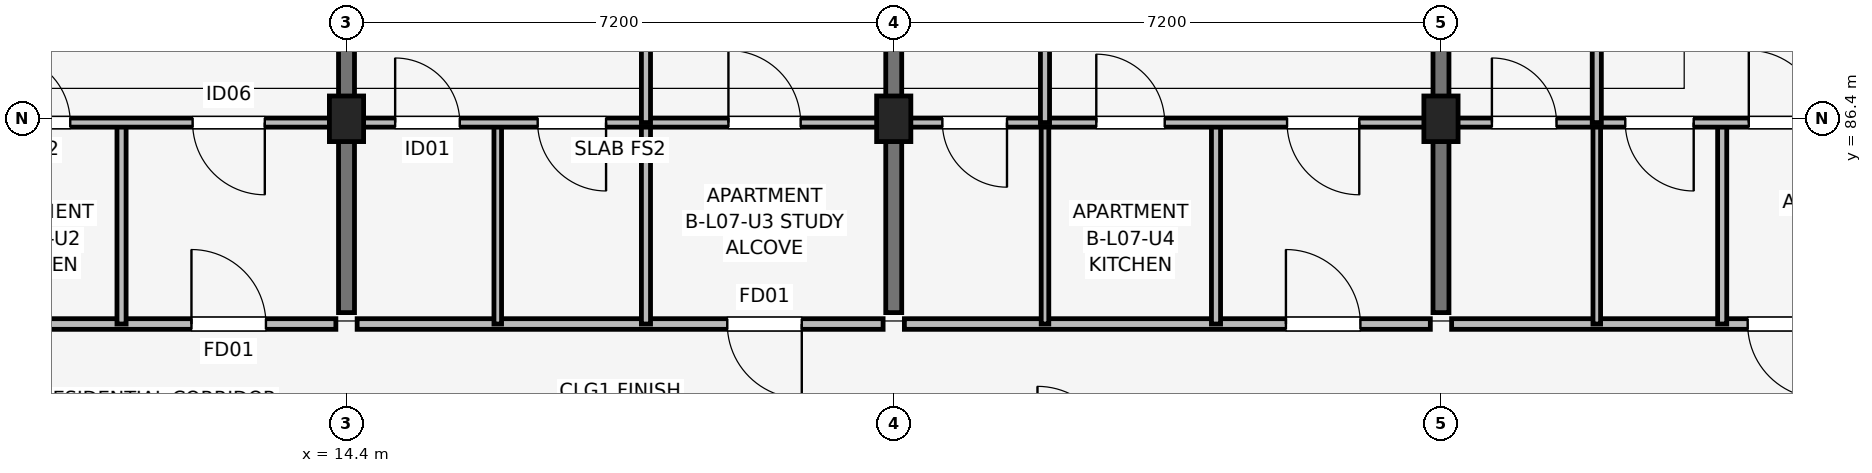
"""IFC4 building model, lengths in metres.
Left out: names, types, materials, properties, quantities, classifications, styles, units other than length and angle.
Written with IfcOpenShell. Run it as: python <this file> out.ifc"""

import sys

from ifc_helpers import new_model, si_unit, direction, frame, frame_2d, origin, origin_2d, place, context, subcontext, project, spatial, rectangle, extrude, element, fill, save


model = new_model("IFC4")
c1 = context("Model", 3, precision=1e-05, world=origin(), true_north=direction((0.0, 1.0)))
c2 = subcontext(c1, "Body", "Model", "MODEL_VIEW")
j1 = project(units=[si_unit("LENGTHUNIT", "METRE"), si_unit("PLANEANGLEUNIT", "RADIAN")], contexts=[c1])
p1 = place(None, origin())
s1 = spatial("IfcSite", under=j1, at=p1, CompositionType="ELEMENT")
p2 = place(p1, origin())
s2 = spatial("IfcBuilding", under=s1, at=p2, CompositionType="ELEMENT")
p3 = place(p2, frame((0.0, 0.0, 24.45)))
s3 = spatial("IfcBuildingStorey", under=s2, at=p3, CompositionType="ELEMENT", Elevation=24.45)
for number, where, z_axis, x_axis in (
    (1, (14.4, 86.4, 0.0), (0.0, 0.0, 1.0), (1.0, 0.0, 0.0)),
    (2, (21.6, 86.4, 0.0), (0.0, 0.0, 1.0), (1.0, 0.0, 0.0)),
    (3, (28.8, 86.4, 0.0), (0.0, 0.0, 1.0), (1.0, 0.0, 0.0)),
):
    element("IfcColumn", number, at=place(p3, frame(where, z_axis=z_axis, x_axis=x_axis)), inside=s3, PredefinedType="COLUMN", context=c2, shape_type="SweptSolid", body=[
        extrude(rectangle(XDim=0.45, YDim=0.6, at=origin_2d()), origin(), (0.0, 0.0, 1.0), 3.15),
    ])
for number, where, z_axis, x_axis in (
    (4, (14.4, 83.85, 0.0), (0.0, 0.0, 1.0), (0.0, 1.0, 0.0)),
    (5, (21.6, 83.85, 0.0), (0.0, 0.0, 1.0), (0.0, 1.0, 0.0)),
    (6, (28.8, 83.85, 0.0), (0.0, 0.0, 1.0), (0.0, 1.0, 0.0)),
):
    element("IfcWall", number, at=place(p3, frame(where, z_axis=z_axis, x_axis=x_axis)), inside=s3, PredefinedType="SHEAR", context=c2, shape_type="SweptSolid", body=[
        extrude(rectangle(XDim=9.4, YDim=0.21, at=frame_2d((4.7, 0.0))), origin(), (0.0, 0.0, 1.0), 3.15),
    ])
p4 = place(p3, frame((7.34, 83.7, 0.0), z_axis=(0.0, 0.0, 1.0), x_axis=(1.0, 0.0, 0.0)))
e7 = element("IfcWall", 7, at=p4, inside=s3, PredefinedType="PARTITIONING", context=c2, shape_type="SweptSolid", body=[
    extrude(rectangle(XDim=6.92, YDim=0.14, at=frame_2d((3.46, 0.0))), origin(), (0.0, 0.0, 1.0), 2.38),
])
p5 = place(p4, frame((5.02, 0.0, 0.0)))
e8 = element("IfcOpeningElement", 8, at=p5, cuts=e7, PredefinedType="OPENING", context=c2, shape_type="SweptSolid", body=[
    extrude(rectangle(XDim=0.98, YDim=2.1, at=frame_2d((0.49, 1.05))), frame((0.0, 0.08, 0.0), z_axis=(0.0, -1.0, 0.0), x_axis=(1.0, 0.0, 0.0)), (0.0, 0.0, 1.0), 0.16),
])
p6 = place(p3, frame((11.44, 83.7, 0.0), z_axis=(0.0, 0.0, 1.0), x_axis=(0.0, 1.0, 0.0)))
e9 = element("IfcWall", 9, at=p6, inside=s3, PredefinedType="PARTITIONING", context=c2, shape_type="SweptSolid", body=[
    extrude(rectangle(XDim=2.65, YDim=0.12, at=frame_2d((1.325, 0.0))), origin(), (0.0, 0.0, 1.0), 2.38),
])
p7 = place(p3, frame((7.34, 86.35, 0.0), z_axis=(0.0, 0.0, 1.0), x_axis=(1.0, 0.0, 0.0)))
e10 = element("IfcWall", 10, at=p7, inside=s3, PredefinedType="PARTITIONING", context=c2, shape_type="SweptSolid", body=[
    extrude(rectangle(XDim=6.92, YDim=0.12, at=frame_2d((3.46, 0.0))), origin(), (0.0, 0.0, 1.0), 2.38),
])
p8 = place(p7, frame((1.35, 0.0, 0.0), z_axis=(0.0, 0.0, 1.0), x_axis=(-1.0, 0.0, 0.0)))
e11 = element("IfcOpeningElement", 11, at=p8, cuts=e10, PredefinedType="OPENING", context=c2, shape_type="SweptSolid", body=[
    extrude(rectangle(XDim=0.85, YDim=2.08, at=frame_2d((0.425, 1.04))), frame((0.0, 0.07, 0.0), z_axis=(0.0, -1.0, 0.0), x_axis=(1.0, 0.0, 0.0)), (0.0, 0.0, 1.0), 0.14),
])
p9 = place(p7, frame((2.525, 0.0, 0.0)))
e12 = element("IfcOpeningElement", 12, at=p9, cuts=e10, PredefinedType="OPENING", context=c2, shape_type="SweptSolid", body=[
    extrude(rectangle(XDim=0.9, YDim=2.08, at=frame_2d((0.45, 1.04))), frame((0.0, 0.07, 0.0), z_axis=(0.0, -1.0, 0.0), x_axis=(1.0, 0.0, 0.0)), (0.0, 0.0, 1.0), 0.14),
])
p10 = place(p7, frame((5.985, 0.0, 0.0), z_axis=(0.0, 0.0, 1.0), x_axis=(-1.0, 0.0, 0.0)))
e13 = element("IfcOpeningElement", 13, at=p10, cuts=e10, PredefinedType="OPENING", context=c2, shape_type="SweptSolid", body=[
    extrude(rectangle(XDim=0.95, YDim=2.08, at=frame_2d((0.475, 1.04))), frame((0.0, 0.07, 0.0), z_axis=(0.0, -1.0, 0.0), x_axis=(1.0, 0.0, 0.0)), (0.0, 0.0, 1.0), 0.14),
])
p11 = place(p3, frame((14.54, 83.7, 0.0), z_axis=(0.0, 0.0, 1.0), x_axis=(1.0, 0.0, 0.0)))
e14 = element("IfcWall", 14, at=p11, inside=s3, PredefinedType="PARTITIONING", context=c2, shape_type="SweptSolid", body=[
    extrude(rectangle(XDim=6.92, YDim=0.14, at=frame_2d((3.46, 0.0))), origin(), (0.0, 0.0, 1.0), 2.38),
])
p12 = place(p11, frame((5.85, 0.0, 0.0), z_axis=(0.0, 0.0, 1.0), x_axis=(-1.0, 0.0, 0.0)))
e15 = element("IfcOpeningElement", 15, at=p12, cuts=e14, PredefinedType="OPENING", context=c2, shape_type="SweptSolid", body=[
    extrude(rectangle(XDim=0.98, YDim=2.1, at=frame_2d((0.49, 1.05))), frame((0.0, 0.08, 0.0), z_axis=(0.0, -1.0, 0.0), x_axis=(1.0, 0.0, 0.0)), (0.0, 0.0, 1.0), 0.16),
])
p13 = place(p3, frame((16.39, 83.7, 0.0), z_axis=(0.0, 0.0, 1.0), x_axis=(0.0, 1.0, 0.0)))
e16 = element("IfcWall", 16, at=p13, inside=s3, PredefinedType="PARTITIONING", context=c2, shape_type="SweptSolid", body=[
    extrude(rectangle(XDim=2.65, YDim=0.1, at=frame_2d((1.325, 0.0))), origin(), (0.0, 0.0, 1.0), 2.38),
])
p14 = place(p3, frame((18.34, 83.7, 0.0), z_axis=(0.0, 0.0, 1.0), x_axis=(0.0, 1.0, 0.0)))
e17 = element("IfcWall", 17, at=p14, inside=s3, PredefinedType="PARTITIONING", context=c2, shape_type="SweptSolid", body=[
    extrude(rectangle(XDim=2.65, YDim=0.12, at=frame_2d((1.325, 0.0))), origin(), (0.0, 0.0, 1.0), 2.38),
])
p15 = place(p3, frame((14.54, 86.35, 0.0), z_axis=(0.0, 0.0, 1.0), x_axis=(1.0, 0.0, 0.0)))
e18 = element("IfcWall", 18, at=p15, inside=s3, PredefinedType="PARTITIONING", context=c2, shape_type="SweptSolid", body=[
    extrude(rectangle(XDim=6.92, YDim=0.12, at=frame_2d((3.46, 0.0))), origin(), (0.0, 0.0, 1.0), 2.38),
])
p16 = place(p15, frame((0.5, 0.0, 0.0)))
e19 = element("IfcOpeningElement", 19, at=p16, cuts=e18, PredefinedType="OPENING", context=c2, shape_type="SweptSolid", body=[
    extrude(rectangle(XDim=0.85, YDim=2.08, at=frame_2d((0.425, 1.04))), frame((0.0, 0.07, 0.0), z_axis=(0.0, -1.0, 0.0), x_axis=(1.0, 0.0, 0.0)), (0.0, 0.0, 1.0), 0.14),
])
p17 = place(p15, frame((3.275, 0.0, 0.0), z_axis=(0.0, 0.0, 1.0), x_axis=(-1.0, 0.0, 0.0)))
e20 = element("IfcOpeningElement", 20, at=p17, cuts=e18, PredefinedType="OPENING", context=c2, shape_type="SweptSolid", body=[
    extrude(rectangle(XDim=0.9, YDim=2.08, at=frame_2d((0.45, 1.04))), frame((0.0, 0.07, 0.0), z_axis=(0.0, -1.0, 0.0), x_axis=(1.0, 0.0, 0.0)), (0.0, 0.0, 1.0), 0.14),
])
p18 = place(p15, frame((4.885, 0.0, 0.0)))
e21 = element("IfcOpeningElement", 21, at=p18, cuts=e18, PredefinedType="OPENING", context=c2, shape_type="SweptSolid", body=[
    extrude(rectangle(XDim=0.95, YDim=2.08, at=frame_2d((0.475, 1.04))), frame((0.0, 0.07, 0.0), z_axis=(0.0, -1.0, 0.0), x_axis=(1.0, 0.0, 0.0)), (0.0, 0.0, 1.0), 0.14),
])
p19 = place(p3, frame((18.34, 86.35, 0.0), z_axis=(0.0, 0.0, 1.0), x_axis=(0.0, 1.0, 0.0)))
e22 = element("IfcWall", 22, at=p19, inside=s3, PredefinedType="PARTITIONING", context=c2, shape_type="SweptSolid", body=[
    extrude(rectangle(XDim=6.95, YDim=0.12, at=frame_2d((3.475, 0.0))), origin(), (0.0, 0.0, 1.0), 2.38),
])
p20 = place(p19, frame((3.925, 0.0, 0.0), z_axis=(0.0, 0.0, 1.0), x_axis=(-1.0, 0.0, 0.0)))
e23 = element("IfcOpeningElement", 23, at=p20, cuts=e22, PredefinedType="OPENING", context=c2, shape_type="SweptSolid", body=[
    extrude(rectangle(XDim=0.9, YDim=2.08, at=frame_2d((0.45, 1.04))), frame((0.0, 0.07, 0.0), z_axis=(0.0, -1.0, 0.0), x_axis=(1.0, 0.0, 0.0)), (0.0, 0.0, 1.0), 0.14),
])
p21 = place(p3, frame((21.74, 83.7, 0.0), z_axis=(0.0, 0.0, 1.0), x_axis=(1.0, 0.0, 0.0)))
e24 = element("IfcWall", 24, at=p21, inside=s3, PredefinedType="PARTITIONING", context=c2, shape_type="SweptSolid", body=[
    extrude(rectangle(XDim=6.92, YDim=0.14, at=frame_2d((3.46, 0.0))), origin(), (0.0, 0.0, 1.0), 2.38),
])
p22 = place(p21, frame((5.02, 0.0, 0.0)))
e25 = element("IfcOpeningElement", 25, at=p22, cuts=e24, PredefinedType="OPENING", context=c2, shape_type="SweptSolid", body=[
    extrude(rectangle(XDim=0.98, YDim=2.1, at=frame_2d((0.49, 1.05))), frame((0.0, 0.08, 0.0), z_axis=(0.0, -1.0, 0.0), x_axis=(1.0, 0.0, 0.0)), (0.0, 0.0, 1.0), 0.16),
])
p23 = place(p3, frame((23.59, 83.7, 0.0), z_axis=(0.0, 0.0, 1.0), x_axis=(0.0, 1.0, 0.0)))
e26 = element("IfcWall", 26, at=p23, inside=s3, PredefinedType="PARTITIONING", context=c2, shape_type="SweptSolid", body=[
    extrude(rectangle(XDim=2.65, YDim=0.1, at=frame_2d((1.325, 0.0))), origin(), (0.0, 0.0, 1.0), 2.38),
])
p24 = place(p3, frame((25.84, 83.7, 0.0), z_axis=(0.0, 0.0, 1.0), x_axis=(0.0, 1.0, 0.0)))
e27 = element("IfcWall", 27, at=p24, inside=s3, PredefinedType="PARTITIONING", context=c2, shape_type="SweptSolid", body=[
    extrude(rectangle(XDim=2.65, YDim=0.12, at=frame_2d((1.325, 0.0))), origin(), (0.0, 0.0, 1.0), 2.38),
])
p25 = place(p3, frame((21.74, 86.35, 0.0), z_axis=(0.0, 0.0, 1.0), x_axis=(1.0, 0.0, 0.0)))
e28 = element("IfcWall", 28, at=p25, inside=s3, PredefinedType="PARTITIONING", context=c2, shape_type="SweptSolid", body=[
    extrude(rectangle(XDim=6.92, YDim=0.12, at=frame_2d((3.46, 0.0))), origin(), (0.0, 0.0, 1.0), 2.38),
])
p26 = place(p25, frame((1.35, 0.0, 0.0), z_axis=(0.0, 0.0, 1.0), x_axis=(-1.0, 0.0, 0.0)))
e29 = element("IfcOpeningElement", 29, at=p26, cuts=e28, PredefinedType="OPENING", context=c2, shape_type="SweptSolid", body=[
    extrude(rectangle(XDim=0.85, YDim=2.08, at=frame_2d((0.425, 1.04))), frame((0.0, 0.07, 0.0), z_axis=(0.0, -1.0, 0.0), x_axis=(1.0, 0.0, 0.0)), (0.0, 0.0, 1.0), 0.14),
])
p27 = place(p25, frame((2.525, 0.0, 0.0)))
e30 = element("IfcOpeningElement", 30, at=p27, cuts=e28, PredefinedType="OPENING", context=c2, shape_type="SweptSolid", body=[
    extrude(rectangle(XDim=0.9, YDim=2.08, at=frame_2d((0.45, 1.04))), frame((0.0, 0.07, 0.0), z_axis=(0.0, -1.0, 0.0), x_axis=(1.0, 0.0, 0.0)), (0.0, 0.0, 1.0), 0.14),
])
p28 = place(p25, frame((5.985, 0.0, 0.0), z_axis=(0.0, 0.0, 1.0), x_axis=(-1.0, 0.0, 0.0)))
e31 = element("IfcOpeningElement", 31, at=p28, cuts=e28, PredefinedType="OPENING", context=c2, shape_type="SweptSolid", body=[
    extrude(rectangle(XDim=0.95, YDim=2.08, at=frame_2d((0.475, 1.04))), frame((0.0, 0.07, 0.0), z_axis=(0.0, -1.0, 0.0), x_axis=(1.0, 0.0, 0.0)), (0.0, 0.0, 1.0), 0.14),
])
p29 = place(p3, frame((23.59, 86.35, 0.0), z_axis=(0.0, 0.0, 1.0), x_axis=(0.0, 1.0, 0.0)))
e32 = element("IfcWall", 32, at=p29, inside=s3, PredefinedType="PARTITIONING", context=c2, shape_type="SweptSolid", body=[
    extrude(rectangle(XDim=6.95, YDim=0.12, at=frame_2d((3.475, 0.0))), origin(), (0.0, 0.0, 1.0), 2.38),
])
p30 = place(p29, frame((3.025, 0.0, 0.0)))
e33 = element("IfcOpeningElement", 33, at=p30, cuts=e32, PredefinedType="OPENING", context=c2, shape_type="SweptSolid", body=[
    extrude(rectangle(XDim=0.9, YDim=2.08, at=frame_2d((0.45, 1.04))), frame((0.0, 0.07, 0.0), z_axis=(0.0, -1.0, 0.0), x_axis=(1.0, 0.0, 0.0)), (0.0, 0.0, 1.0), 0.14),
])
p31 = place(p3, frame((28.94, 83.7, 0.0), z_axis=(0.0, 0.0, 1.0), x_axis=(1.0, 0.0, 0.0)))
e34 = element("IfcWall", 34, at=p31, inside=s3, PredefinedType="PARTITIONING", context=c2, shape_type="SweptSolid", body=[
    extrude(rectangle(XDim=6.92, YDim=0.14, at=frame_2d((3.46, 0.0))), origin(), (0.0, 0.0, 1.0), 2.38),
])
p32 = place(p31, frame((4.875, 0.0, 0.0), z_axis=(0.0, 0.0, 1.0), x_axis=(-1.0, 0.0, 0.0)))
e35 = element("IfcOpeningElement", 35, at=p32, cuts=e34, PredefinedType="OPENING", context=c2, shape_type="SweptSolid", body=[
    extrude(rectangle(XDim=0.98, YDim=2.1, at=frame_2d((0.49, 1.05))), frame((0.0, 0.08, 0.0), z_axis=(0.0, -1.0, 0.0), x_axis=(1.0, 0.0, 0.0)), (0.0, 0.0, 1.0), 0.16),
])
p33 = place(p3, frame((30.85, 83.7, 0.0), z_axis=(0.0, 0.0, 1.0), x_axis=(0.0, 1.0, 0.0)))
e36 = element("IfcWall", 36, at=p33, inside=s3, PredefinedType="PARTITIONING", context=c2, shape_type="SweptSolid", body=[
    extrude(rectangle(XDim=2.65, YDim=0.1, at=frame_2d((1.325, 0.0))), origin(), (0.0, 0.0, 1.0), 2.38),
])
p34 = place(p3, frame((32.5, 83.7, 0.0), z_axis=(0.0, 0.0, 1.0), x_axis=(0.0, 1.0, 0.0)))
e37 = element("IfcWall", 37, at=p34, inside=s3, PredefinedType="PARTITIONING", context=c2, shape_type="SweptSolid", body=[
    extrude(rectangle(XDim=2.65, YDim=0.12, at=frame_2d((1.325, 0.0))), origin(), (0.0, 0.0, 1.0), 2.38),
])
p35 = place(p3, frame((28.94, 86.35, 0.0), z_axis=(0.0, 0.0, 1.0), x_axis=(1.0, 0.0, 0.0)))
e38 = element("IfcWall", 38, at=p35, inside=s3, PredefinedType="PARTITIONING", context=c2, shape_type="SweptSolid", body=[
    extrude(rectangle(XDim=6.92, YDim=0.12, at=frame_2d((3.46, 0.0))), origin(), (0.0, 0.0, 1.0), 2.38),
])
p36 = place(p35, frame((0.53, 0.0, 0.0)))
e39 = element("IfcOpeningElement", 39, at=p36, cuts=e38, PredefinedType="OPENING", context=c2, shape_type="SweptSolid", body=[
    extrude(rectangle(XDim=0.85, YDim=2.08, at=frame_2d((0.425, 1.04))), frame((0.0, 0.07, 0.0), z_axis=(0.0, -1.0, 0.0), x_axis=(1.0, 0.0, 0.0)), (0.0, 0.0, 1.0), 0.14),
])
p37 = place(p35, frame((3.185, 0.0, 0.0), z_axis=(0.0, 0.0, 1.0), x_axis=(-1.0, 0.0, 0.0)))
e40 = element("IfcOpeningElement", 40, at=p37, cuts=e38, PredefinedType="OPENING", context=c2, shape_type="SweptSolid", body=[
    extrude(rectangle(XDim=0.9, YDim=2.08, at=frame_2d((0.45, 1.04))), frame((0.0, 0.07, 0.0), z_axis=(0.0, -1.0, 0.0), x_axis=(1.0, 0.0, 0.0)), (0.0, 0.0, 1.0), 0.14),
])
p38 = place(p35, frame((3.91, 0.0, 0.0)))
e41 = element("IfcOpeningElement", 41, at=p38, cuts=e38, PredefinedType="OPENING", context=c2, shape_type="SweptSolid", body=[
    extrude(rectangle(XDim=0.95, YDim=2.08, at=frame_2d((0.475, 1.04))), frame((0.0, 0.07, 0.0), z_axis=(0.0, -1.0, 0.0), x_axis=(1.0, 0.0, 0.0)), (0.0, 0.0, 1.0), 0.14),
])
p39 = place(p3, frame((30.85, 86.35, 0.0), z_axis=(0.0, 0.0, 1.0), x_axis=(0.0, 1.0, 0.0)))
e42 = element("IfcWall", 42, at=p39, inside=s3, PredefinedType="PARTITIONING", context=c2, shape_type="SweptSolid", body=[
    extrude(rectangle(XDim=6.95, YDim=0.12, at=frame_2d((3.475, 0.0))), origin(), (0.0, 0.0, 1.0), 2.38),
])
p40 = place(p39, frame((3.025, 0.0, 0.0)))
e43 = element("IfcOpeningElement", 43, at=p40, cuts=e42, PredefinedType="OPENING", context=c2, shape_type="SweptSolid", body=[
    extrude(rectangle(XDim=0.9, YDim=2.08, at=frame_2d((0.45, 1.04))), frame((0.0, 0.07, 0.0), z_axis=(0.0, -1.0, 0.0), x_axis=(1.0, 0.0, 0.0)), (0.0, 0.0, 1.0), 0.14),
])
p41 = place(p5, origin())
e44 = element("IfcDoor", 44, at=p41, inside=s3, OperationType="SINGLE_SWING_LEFT", PredefinedType="DOOR", context=c2, shape_type="SweptSolid", body=[
    extrude(rectangle(XDim=0.98, YDim=2.1, at=frame_2d((0.49, 1.05))), frame((0.0, 0.025, 0.0), z_axis=(0.0, -1.0, 0.0), x_axis=(1.0, 0.0, 0.0)), (0.0, 0.0, 1.0), 0.05),
])
fill(e8, e44)
p42 = place(p9, origin())
e45 = element("IfcDoor", 45, at=p42, inside=s3, OperationType="SINGLE_SWING_LEFT", PredefinedType="DOOR", context=c2, shape_type="SweptSolid", body=[
    extrude(rectangle(XDim=0.9, YDim=2.08, at=frame_2d((0.45, 1.04))), frame((0.0, 0.025, 0.0), z_axis=(0.0, -1.0, 0.0), x_axis=(1.0, 0.0, 0.0)), (0.0, 0.0, 1.0), 0.05),
])
fill(e12, e45)
p43 = place(p10, origin())
e46 = element("IfcDoor", 46, at=p43, inside=s3, OperationType="SINGLE_SWING_RIGHT", PredefinedType="DOOR", context=c2, shape_type="SweptSolid", body=[
    extrude(rectangle(XDim=0.95, YDim=2.08, at=frame_2d((0.475, 1.04))), frame((0.0, 0.025, 0.0), z_axis=(0.0, -1.0, 0.0), x_axis=(1.0, 0.0, 0.0)), (0.0, 0.0, 1.0), 0.05),
])
fill(e13, e46)
p44 = place(p12, origin())
e47 = element("IfcDoor", 47, at=p44, inside=s3, OperationType="SINGLE_SWING_RIGHT", PredefinedType="DOOR", context=c2, shape_type="SweptSolid", body=[
    extrude(rectangle(XDim=0.98, YDim=2.1, at=frame_2d((0.49, 1.05))), frame((0.0, 0.025, 0.0), z_axis=(0.0, -1.0, 0.0), x_axis=(1.0, 0.0, 0.0)), (0.0, 0.0, 1.0), 0.05),
])
fill(e15, e47)
p45 = place(p16, origin())
e48 = element("IfcDoor", 48, at=p45, inside=s3, OperationType="SINGLE_SWING_LEFT", PredefinedType="DOOR", context=c2, shape_type="SweptSolid", body=[
    extrude(rectangle(XDim=0.85, YDim=2.08, at=frame_2d((0.425, 1.04))), frame((0.0, 0.025, 0.0), z_axis=(0.0, -1.0, 0.0), x_axis=(1.0, 0.0, 0.0)), (0.0, 0.0, 1.0), 0.05),
])
fill(e19, e48)
p46 = place(p17, origin())
e49 = element("IfcDoor", 49, at=p46, inside=s3, OperationType="SINGLE_SWING_RIGHT", PredefinedType="DOOR", context=c2, shape_type="SweptSolid", body=[
    extrude(rectangle(XDim=0.9, YDim=2.08, at=frame_2d((0.45, 1.04))), frame((0.0, 0.025, 0.0), z_axis=(0.0, -1.0, 0.0), x_axis=(1.0, 0.0, 0.0)), (0.0, 0.0, 1.0), 0.05),
])
fill(e20, e49)
p47 = place(p18, origin())
e50 = element("IfcDoor", 50, at=p47, inside=s3, OperationType="SINGLE_SWING_LEFT", PredefinedType="DOOR", context=c2, shape_type="SweptSolid", body=[
    extrude(rectangle(XDim=0.95, YDim=2.08, at=frame_2d((0.475, 1.04))), frame((0.0, 0.025, 0.0), z_axis=(0.0, -1.0, 0.0), x_axis=(1.0, 0.0, 0.0)), (0.0, 0.0, 1.0), 0.05),
])
fill(e21, e50)
p48 = place(p22, origin())
e51 = element("IfcDoor", 51, at=p48, inside=s3, OperationType="SINGLE_SWING_LEFT", PredefinedType="DOOR", context=c2, shape_type="SweptSolid", body=[
    extrude(rectangle(XDim=0.98, YDim=2.1, at=frame_2d((0.49, 1.05))), frame((0.0, 0.025, 0.0), z_axis=(0.0, -1.0, 0.0), x_axis=(1.0, 0.0, 0.0)), (0.0, 0.0, 1.0), 0.05),
])
fill(e25, e51)
p49 = place(p26, origin())
e52 = element("IfcDoor", 52, at=p49, inside=s3, OperationType="SINGLE_SWING_RIGHT", PredefinedType="DOOR", context=c2, shape_type="SweptSolid", body=[
    extrude(rectangle(XDim=0.85, YDim=2.08, at=frame_2d((0.425, 1.04))), frame((0.0, 0.025, 0.0), z_axis=(0.0, -1.0, 0.0), x_axis=(1.0, 0.0, 0.0)), (0.0, 0.0, 1.0), 0.05),
])
fill(e29, e52)
p50 = place(p27, origin())
e53 = element("IfcDoor", 53, at=p50, inside=s3, OperationType="SINGLE_SWING_LEFT", PredefinedType="DOOR", context=c2, shape_type="SweptSolid", body=[
    extrude(rectangle(XDim=0.9, YDim=2.08, at=frame_2d((0.45, 1.04))), frame((0.0, 0.025, 0.0), z_axis=(0.0, -1.0, 0.0), x_axis=(1.0, 0.0, 0.0)), (0.0, 0.0, 1.0), 0.05),
])
fill(e30, e53)
p51 = place(p28, origin())
e54 = element("IfcDoor", 54, at=p51, inside=s3, OperationType="SINGLE_SWING_RIGHT", PredefinedType="DOOR", context=c2, shape_type="SweptSolid", body=[
    extrude(rectangle(XDim=0.95, YDim=2.08, at=frame_2d((0.475, 1.04))), frame((0.0, 0.025, 0.0), z_axis=(0.0, -1.0, 0.0), x_axis=(1.0, 0.0, 0.0)), (0.0, 0.0, 1.0), 0.05),
])
fill(e31, e54)
p52 = place(p32, origin())
e55 = element("IfcDoor", 55, at=p52, inside=s3, OperationType="SINGLE_SWING_RIGHT", PredefinedType="DOOR", context=c2, shape_type="SweptSolid", body=[
    extrude(rectangle(XDim=0.98, YDim=2.1, at=frame_2d((0.49, 1.05))), frame((0.0, 0.025, 0.0), z_axis=(0.0, -1.0, 0.0), x_axis=(1.0, 0.0, 0.0)), (0.0, 0.0, 1.0), 0.05),
])
fill(e35, e55)
p53 = place(p36, origin())
e56 = element("IfcDoor", 56, at=p53, inside=s3, OperationType="SINGLE_SWING_LEFT", PredefinedType="DOOR", context=c2, shape_type="SweptSolid", body=[
    extrude(rectangle(XDim=0.85, YDim=2.08, at=frame_2d((0.425, 1.04))), frame((0.0, 0.025, 0.0), z_axis=(0.0, -1.0, 0.0), x_axis=(1.0, 0.0, 0.0)), (0.0, 0.0, 1.0), 0.05),
])
fill(e39, e56)
p54 = place(p37, origin())
e57 = element("IfcDoor", 57, at=p54, inside=s3, OperationType="SINGLE_SWING_RIGHT", PredefinedType="DOOR", context=c2, shape_type="SweptSolid", body=[
    extrude(rectangle(XDim=0.9, YDim=2.08, at=frame_2d((0.45, 1.04))), frame((0.0, 0.025, 0.0), z_axis=(0.0, -1.0, 0.0), x_axis=(1.0, 0.0, 0.0)), (0.0, 0.0, 1.0), 0.05),
])
fill(e40, e57)
p55 = place(p38, origin())
e58 = element("IfcDoor", 58, at=p55, inside=s3, OperationType="SINGLE_SWING_LEFT", PredefinedType="DOOR", context=c2, shape_type="SweptSolid", body=[
    extrude(rectangle(XDim=0.95, YDim=2.08, at=frame_2d((0.475, 1.04))), frame((0.0, 0.025, 0.0), z_axis=(0.0, -1.0, 0.0), x_axis=(1.0, 0.0, 0.0)), (0.0, 0.0, 1.0), 0.05),
])
fill(e41, e58)
save(model, sys.argv[1])
